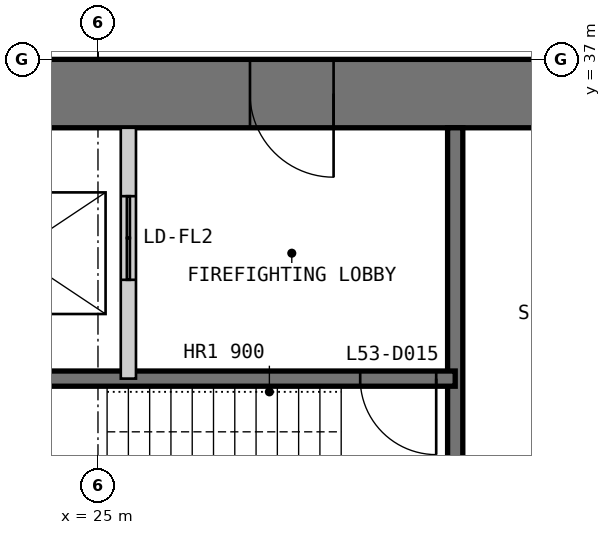
"""IFC4 building model, lengths in metres.
Left out: names, types, materials, properties, quantities, classifications, styles, units other than length and angle.
Written with IfcOpenShell. Run it as: python <this file> out.ifc"""

import sys

from ifc_helpers import new_model, si_unit, direction, frame, frame_2d, origin, place, context, subcontext, project, spatial, polyline, rectangle, outline, extrude, element, fill, save


model = new_model("IFC4")
c1 = context("Model", 3, precision=1e-05, world=origin(), true_north=direction((0.0, 1.0)))
c2 = subcontext(c1, "Body", "Model", "MODEL_VIEW")
j1 = project(units=[si_unit("LENGTHUNIT", "METRE"), si_unit("PLANEANGLEUNIT", "RADIAN")], contexts=[c1])
p1 = place(None, origin())
s1 = spatial("IfcSite", under=j1, at=p1, CompositionType="ELEMENT")
p2 = place(p1, origin())
s2 = spatial("IfcBuilding", under=s1, at=p2, CompositionType="ELEMENT")
p3 = place(p2, frame((0.0, 0.0, 225.8)))
s3 = spatial("IfcBuildingStorey", under=s2, at=p3, CompositionType="ELEMENT", Elevation=225.8)
p4 = place(p3, frame((37.0, 36.55, 0.0), z_axis=(0.0, 0.0, 1.0), x_axis=(-1.0, 0.0, 0.0)))
e1 = element("IfcWall", 1, at=p4, inside=s3, PredefinedType="SHEAR", context=c2, shape_type="SweptSolid", body=[
    extrude(outline(polyline([(0.0, -0.45), (24.0, -0.45), (23.1, 0.45), (0.9, 0.45), (0.0, -0.45)])), origin(), (0.0, 0.0, 1.0), 4.0),
])
p5 = place(p4, frame((4.9, 0.0, 0.0)))
e2 = element("IfcOpeningElement", 2, at=p5, cuts=e1, PredefinedType="OPENING", context=c2, shape_type="SweptSolid", body=[
    extrude(rectangle(XDim=1.0, YDim=2.2, at=frame_2d((0.5, 1.1))), frame((0.0, 0.46, 0.0), z_axis=(0.0, -1.0, 0.0), x_axis=(1.0, 0.0, 0.0)), (0.0, 0.0, 1.0), 0.92),
])
p6 = place(p4, frame((8.9, 0.0, 0.0)))
e3 = element("IfcOpeningElement", 3, at=p6, cuts=e1, PredefinedType="OPENING", context=c2, shape_type="SweptSolid", body=[
    extrude(rectangle(XDim=1.1, YDim=2.2, at=frame_2d((0.55, 1.1))), frame((0.0, 0.46, 0.0), z_axis=(0.0, -1.0, 0.0), x_axis=(1.0, 0.0, 0.0)), (0.0, 0.0, 1.0), 0.92),
])
p7 = place(p4, frame((15.05, 0.0, 0.0)))
e4 = element("IfcOpeningElement", 4, at=p7, cuts=e1, PredefinedType="OPENING", context=c2, shape_type="SweptSolid", body=[
    extrude(rectangle(XDim=0.9, YDim=2.2, at=frame_2d((0.45, 1.1))), frame((0.0, 0.46, 0.0), z_axis=(0.0, -1.0, 0.0), x_axis=(1.0, 0.0, 0.0)), (0.0, 0.0, 1.0), 0.92),
])
p8 = place(p4, frame((17.9, 0.0, 0.0)))
e5 = element("IfcOpeningElement", 5, at=p8, cuts=e1, PredefinedType="OPENING", context=c2, shape_type="SweptSolid", body=[
    extrude(rectangle(XDim=1.0, YDim=2.2, at=frame_2d((0.5, 1.1))), frame((0.0, 0.46, 0.0), z_axis=(0.0, -1.0, 0.0), x_axis=(1.0, 0.0, 0.0)), (0.0, 0.0, 1.0), 0.92),
])
p9 = place(p4, frame((21.4, 0.0, 0.0)))
e6 = element("IfcOpeningElement", 6, at=p9, cuts=e1, PredefinedType="OPENING", context=c2, shape_type="SweptSolid", body=[
    extrude(rectangle(XDim=1.0, YDim=2.2, at=frame_2d((0.5, 1.1))), frame((0.0, 0.46, 0.0), z_axis=(0.0, -1.0, 0.0), x_axis=(1.0, 0.0, 0.0)), (0.0, 0.0, 1.0), 0.92),
])
p10 = place(p3, frame((29.7, 36.1, 0.0), z_axis=(0.0, 0.0, 1.0), x_axis=(0.0, -1.0, 0.0)))
e7 = element("IfcWall", 7, at=p10, inside=s3, PredefinedType="SOLIDWALL", context=c2, shape_type="SweptSolid", body=[
    extrude(rectangle(XDim=16.1, YDim=0.2, at=frame_2d((8.05, 0.0))), origin(), (0.0, 0.0, 1.0), 3.8),
])
p11 = place(p10, frame((7.217, 0.0, 0.0)))
e8 = element("IfcOpeningElement", 8, at=p11, cuts=e7, PredefinedType="OPENING", context=c2, shape_type="SweptSolid", body=[
    extrude(rectangle(XDim=1.1, YDim=2.2, at=frame_2d((0.55, 1.1))), frame((0.0, 0.11, 0.0), z_axis=(0.0, -1.0, 0.0), x_axis=(1.0, 0.0, 0.0)), (0.0, 0.0, 1.0), 0.22),
])
p12 = place(p10, frame((10.55, 0.0, 0.0)))
e9 = element("IfcOpeningElement", 9, at=p12, cuts=e7, PredefinedType="OPENING", context=c2, shape_type="SweptSolid", body=[
    extrude(rectangle(XDim=1.1, YDim=2.2, at=frame_2d((0.55, 1.1))), frame((0.0, 0.11, 0.0), z_axis=(0.0, -1.0, 0.0), x_axis=(1.0, 0.0, 0.0)), (0.0, 0.0, 1.0), 0.22),
])
p13 = place(p10, frame((13.883, 0.0, 0.0)))
e10 = element("IfcOpeningElement", 10, at=p13, cuts=e7, PredefinedType="OPENING", context=c2, shape_type="SweptSolid", body=[
    extrude(rectangle(XDim=1.1, YDim=2.2, at=frame_2d((0.55, 1.1))), frame((0.0, 0.11, 0.0), z_axis=(0.0, -1.0, 0.0), x_axis=(1.0, 0.0, 0.0)), (0.0, 0.0, 1.0), 0.22),
])
p14 = place(p3, frame((29.7, 32.8, 0.0), z_axis=(0.0, 0.0, 1.0), x_axis=(-1.0, 0.0, 0.0)))
e11 = element("IfcWall", 11, at=p14, inside=s3, PredefinedType="SOLIDWALL", context=c2, shape_type="SweptSolid", body=[
    extrude(rectangle(XDim=9.4, YDim=0.2, at=frame_2d((4.7, 0.0))), origin(), (0.0, 0.0, 1.0), 3.8),
])
p15 = place(p14, frame((0.25, 0.0, 0.0)))
e12 = element("IfcOpeningElement", 12, at=p15, cuts=e11, PredefinedType="OPENING", context=c2, shape_type="SweptSolid", body=[
    extrude(rectangle(XDim=1.0, YDim=2.2, at=frame_2d((0.5, 1.1))), frame((0.0, 0.11, 0.0), z_axis=(0.0, -1.0, 0.0), x_axis=(1.0, 0.0, 0.0)), (0.0, 0.0, 1.0), 0.22),
])
p16 = place(p3, frame((25.4, 36.1, 0.0), z_axis=(0.0, 0.0, 1.0), x_axis=(0.0, -1.0, 0.0)))
e13 = element("IfcWall", 13, at=p16, inside=s3, PredefinedType="PARTITIONING", context=c2, shape_type="SweptSolid", body=[
    extrude(rectangle(XDim=3.3, YDim=0.2, at=frame_2d((1.65, 0.0))), origin(), (0.0, 0.0, 1.0), 3.8),
])
p17 = place(p16, frame((0.9, 0.0, 0.0)))
e14 = element("IfcOpeningElement", 14, at=p17, cuts=e13, PredefinedType="OPENING", context=c2, shape_type="SweptSolid", body=[
    extrude(rectangle(XDim=1.1, YDim=2.2, at=frame_2d((0.55, 1.1))), frame((0.0, 0.11, 0.0), z_axis=(0.0, -1.0, 0.0), x_axis=(1.0, 0.0, 0.0)), (0.0, 0.0, 1.0), 0.22),
])
p18 = place(p6, origin())
e15 = element("IfcDoor", 15, at=p18, inside=s3, OperationType="SINGLE_SWING_LEFT", PredefinedType="DOOR", context=c2, shape_type="SweptSolid", body=[
    extrude(rectangle(XDim=1.1, YDim=2.2, at=frame_2d((0.55, 1.1))), frame((0.0, 0.025, 0.0), z_axis=(0.0, -1.0, 0.0), x_axis=(1.0, 0.0, 0.0)), (0.0, 0.0, 1.0), 0.05),
    extrude(outline(polyline([(0.0, 0.0), (0.04, 0.0), (0.04, 2.16), (1.06, 2.16), (1.06, 0.0), (1.1, 0.0), (1.1, 2.2), (0.0, 2.2), (0.0, 0.0)])), frame((0.0, 0.3, 0.0), z_axis=(0.0, -1.0, 0.0), x_axis=(1.0, 0.0, 0.0)), (0.0, 0.0, 1.0), 0.6),
])
fill(e3, e15)
p19 = place(p15, origin())
e16 = element("IfcDoor", 16, at=p19, inside=s3, OperationType="SINGLE_SWING_LEFT", PredefinedType="DOOR", context=c2, shape_type="SweptSolid", body=[
    extrude(rectangle(XDim=1.0, YDim=2.2, at=frame_2d((0.5, 1.1))), frame((0.0, 0.025, 0.0), z_axis=(0.0, -1.0, 0.0), x_axis=(1.0, 0.0, 0.0)), (0.0, 0.0, 1.0), 0.05),
])
fill(e12, e16)
p20 = place(p17, origin())
e17 = element("IfcDoor", 17, at=p20, inside=s3, OperationType="DOUBLE_DOOR_SLIDING", PredefinedType="DOOR", context=c2, shape_type="SweptSolid", body=[
    extrude(rectangle(XDim=1.1, YDim=2.2, at=frame_2d((0.55, 1.1))), frame((0.0, 0.025, 0.0), z_axis=(0.0, -1.0, 0.0), x_axis=(1.0, 0.0, 0.0)), (0.0, 0.0, 1.0), 0.05),
])
fill(e14, e17)
save(model, sys.argv[1])
